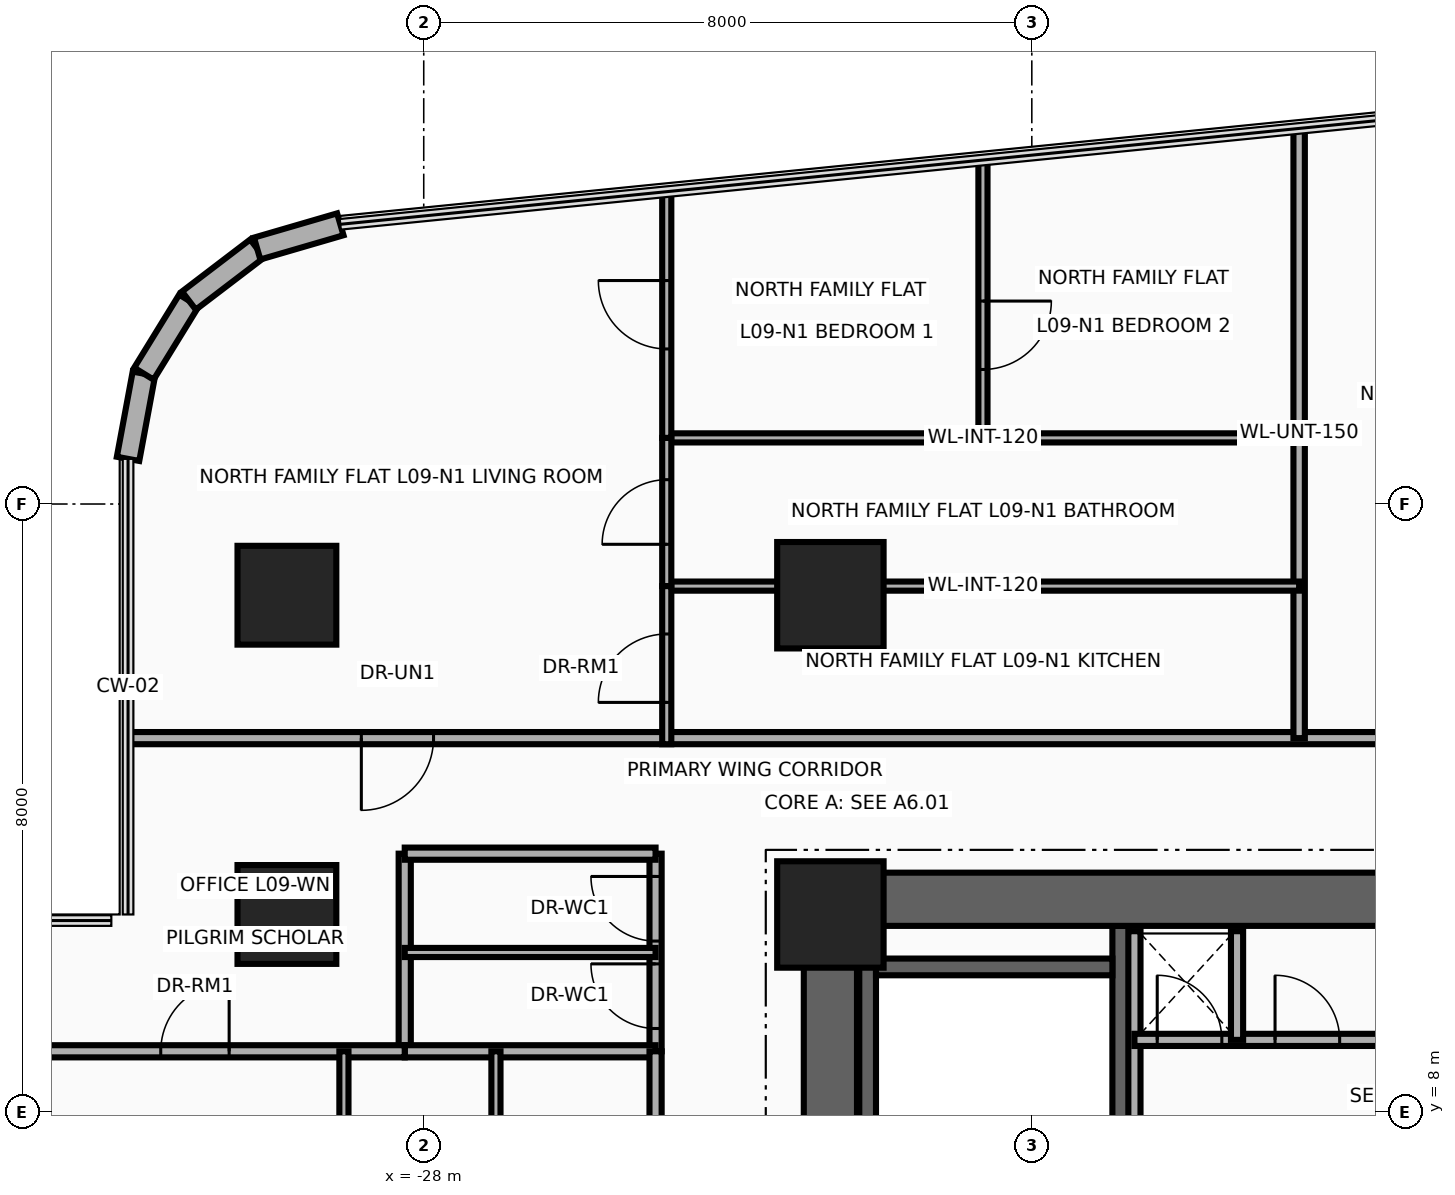
"""IFC4 building model, lengths in metres.
Left out: names, types, materials, properties, quantities, classifications, styles, units other than length and angle.
Written with IfcOpenShell. Run it as: python <this file> out.ifc"""

import sys

from ifc_helpers import new_model, si_unit, direction, frame, frame_2d, origin, origin_2d, place, context, subcontext, project, spatial, rectangle, circle, extrude, source, transform, mapped, element, fill, save


model = new_model("IFC4")
c1 = context("Model", 3, precision=1e-05, world=origin(), true_north=direction((0.0, 1.0)))
c2 = subcontext(c1, "Body", "Model", "MODEL_VIEW")
j1 = project(units=[si_unit("LENGTHUNIT", "METRE"), si_unit("PLANEANGLEUNIT", "RADIAN")], contexts=[c1])
p1 = place(None, origin())
s1 = spatial("IfcSite", under=j1, at=p1, CompositionType="ELEMENT")
p2 = place(p1, origin())
s2 = spatial("IfcBuilding", under=s1, at=p2, CompositionType="ELEMENT")
p3 = place(p2, frame((0.0, 0.0, 40.8)))
s3 = spatial("IfcBuildingStorey", under=s2, at=p3, CompositionType="ELEMENT", Elevation=40.8)
for number, where, z_axis, x_axis in (
    (1, (-22.16, 1.78, 0.0), (0.0, 0.0, 1.0), (0.0, 1.0, 0.0)),
    (2, (-18.83, 1.78, 0.0), (0.0, 0.0, 1.0), (0.0, 1.0, 0.0)),
):
    element("IfcWall", number, at=place(p3, frame(where, z_axis=z_axis, x_axis=x_axis)), inside=s3, PredefinedType="SHEAR", context=c2, shape_type="SweptSolid", body=[
        extrude(rectangle(XDim=8.67, YDim=0.22, at=frame_2d((4.335, 0.0))), origin(), (0.0, 0.0, 1.0), 3.46),
    ])
p4 = place(p3, frame((-22.05, 9.91, 0.0), z_axis=(0.0, 0.0, 1.0), x_axis=(1.0, 0.0, 0.0)))
e3 = element("IfcWall", 3, at=p4, inside=s3, PredefinedType="SHEAR", context=c2, shape_type="SweptSolid", body=[
    extrude(rectangle(XDim=3.11, YDim=0.22, at=frame_2d((1.555, 0.0))), origin(), (0.0, 0.0, 1.0), 3.46),
])
p5 = place(p3, frame((-22.65, -11.15, 0.0), z_axis=(0.0, 0.0, 1.0), x_axis=(0.0, 1.0, 0.0)))
e4 = element("IfcWall", 4, at=p5, inside=s3, PredefinedType="SHEAR", context=c2, shape_type="SweptSolid", body=[
    extrude(rectangle(XDim=22.3, YDim=0.7, at=frame_2d((11.15, 0.0))), origin(), (0.0, 0.0, 1.0), 3.46),
])
p6 = place(p3, frame((-22.65, 10.8, 0.0), z_axis=(0.0, 0.0, 1.0), x_axis=(1.0, 0.0, 0.0)))
e5 = element("IfcWall", 5, at=p6, inside=s3, PredefinedType="SHEAR", context=c2, shape_type="SweptSolid", body=[
    extrude(rectangle(XDim=10.25, YDim=0.7, at=frame_2d((5.125, 0.0))), origin(), (0.0, 0.0, 1.0), 3.46),
])
m1 = source(origin(), c2, "Body", "SweptSolid", [
    extrude(circle(Radius=0.65, at=origin_2d()), origin(), (0.0, 0.0, 1.0), 3.7),
])
p7 = place(p3, frame((-29.8, 10.6, 0.0), z_axis=(0.0, 0.0, 1.0), x_axis=(1.0, 0.0, 0.0)))
e6 = element("IfcColumn", 6, at=p7, inside=s3, PredefinedType="COLUMN", context=c2, shape_type="MappedRepresentation", body=[
    mapped(m1, transform((0.0, 0.0, 0.0), x_axis=(1.0, 0.0, 0.0), y_axis=(0.0, 1.0, 0.0), z_axis=(0.0, 0.0, 1.0), scale=1.0)),
])
m2 = source(origin(), c2, "Body", "SweptSolid", [
    extrude(rectangle(XDim=1.4, YDim=1.4, at=origin_2d()), origin(), (0.0, 0.0, 1.0), 3.7),
])
p8 = place(p3, frame((-22.65, 10.6, 0.0), z_axis=(0.0, 0.0, 1.0), x_axis=(1.0, 0.0, 0.0)))
e7 = element("IfcColumn", 7, at=p8, inside=s3, PredefinedType="COLUMN", context=c2, shape_type="MappedRepresentation", body=[
    mapped(m2, transform((0.0, 0.0, 0.0), x_axis=(1.0, 0.0, 0.0), y_axis=(0.0, 1.0, 0.0), z_axis=(0.0, 0.0, 1.0), scale=1.0)),
])
p9 = place(p3, frame((-29.8, 14.8, 0.0), z_axis=(0.0, 0.0, 1.0), x_axis=(1.0, 0.0, 0.0)))
e8 = element("IfcColumn", 8, at=p9, inside=s3, PredefinedType="COLUMN", context=c2, shape_type="MappedRepresentation", body=[
    mapped(m1, transform((0.0, 0.0, 0.0), x_axis=(1.0, 0.0, 0.0), y_axis=(0.0, 1.0, 0.0), z_axis=(0.0, 0.0, 1.0), scale=1.0)),
])
p10 = place(p3, frame((-22.65, 14.8, 0.0), z_axis=(0.0, 0.0, 1.0), x_axis=(1.0, 0.0, 0.0)))
e9 = element("IfcColumn", 9, at=p10, inside=s3, PredefinedType="COLUMN", context=c2, shape_type="MappedRepresentation", body=[
    mapped(m2, transform((0.0, 0.0, 0.0), x_axis=(1.0, 0.0, 0.0), y_axis=(0.0, 1.0, 0.0), z_axis=(0.0, 0.0, 1.0), scale=1.0)),
])
p11 = place(p3, frame((-31.89, 16.594, 0.0), z_axis=(0.0, 0.0, 1.0), x_axis=(0.182748995683, 0.9831596028, 0.0)))
e10 = element("IfcWall", 10, at=p11, inside=s3, PredefinedType="SOLIDWALL", context=c2, shape_type="SweptSolid", body=[
    extrude(rectangle(XDim=1.14, YDim=0.3, at=frame_2d((0.57, 0.0))), origin(), (0.0, 0.0, 1.0), 3.46),
])
p12 = place(p3, frame((-31.682, 17.714, 0.0), z_axis=(0.0, 0.0, 1.0), x_axis=(0.524157723014, 0.8516212077, 0.0)))
e11 = element("IfcWall", 11, at=p12, inside=s3, PredefinedType="SOLIDWALL", context=c2, shape_type="SweptSolid", body=[
    extrude(rectangle(XDim=1.129, YDim=0.3, at=frame_2d((0.565, 0.0))), origin(), (0.0, 0.0, 1.0), 3.46),
])
p13 = place(p3, frame((-31.09, 18.676, 0.0), z_axis=(0.0, 0.0, 1.0), x_axis=(0.795253002434, 0.606277710393, 0.0)))
e12 = element("IfcWall", 12, at=p13, inside=s3, PredefinedType="SOLIDWALL", context=c2, shape_type="SweptSolid", body=[
    extrude(rectangle(XDim=1.129, YDim=0.3, at=frame_2d((0.564, 0.0))), origin(), (0.0, 0.0, 1.0), 3.46),
])
p14 = place(p3, frame((-30.192, 19.361, 0.0), z_axis=(0.0, 0.0, 1.0), x_axis=(0.960071941549, 0.279753225271, 0.0)))
e13 = element("IfcWall", 13, at=p14, inside=s3, PredefinedType="SOLIDWALL", context=c2, shape_type="SweptSolid", body=[
    extrude(rectangle(XDim=1.14, YDim=0.3, at=frame_2d((0.57, 0.0))), origin(), (0.0, 0.0, 1.0), 3.46),
])
p15 = place(p3, frame((-18.65, 7.45, 0.0), z_axis=(0.0, 0.0, 1.0), x_axis=(0.0, 1.0, 0.0)))
e14 = element("IfcWall", 14, at=p15, inside=s3, PredefinedType="PARTITIONING", context=c2, shape_type="SweptSolid", body=[
    extrude(rectangle(XDim=2.93, YDim=0.16, at=frame_2d((1.465, 0.0))), origin(), (0.0, 0.0, 1.0), 3.46),
])
p16 = place(p3, frame((-18.65, 8.95, 0.0), z_axis=(0.0, 0.0, 1.0), x_axis=(1.0, 0.0, 0.0)))
e15 = element("IfcWall", 15, at=p16, inside=s3, PredefinedType="PARTITIONING", context=c2, shape_type="SweptSolid", body=[
    extrude(rectangle(XDim=5.5, YDim=0.16, at=frame_2d((2.75, 0.0))), origin(), (0.0, 0.0, 1.0), 3.46),
])
p17 = place(p16, frame((0.3, 0.0, 0.0)))
e16 = element("IfcOpeningElement", 16, at=p17, cuts=e15, PredefinedType="OPENING", context=c2, shape_type="SweptSolid", body=[
    extrude(rectangle(XDim=0.85, YDim=2.05, at=frame_2d((0.425, 1.025))), frame((0.0, 0.095, 0.0), z_axis=(0.0, -1.0, 0.0), x_axis=(1.0, 0.0, 0.0)), (0.0, 0.0, 1.0), 0.19),
])
p18 = place(p16, frame((1.85, 0.0, 0.0)))
e17 = element("IfcOpeningElement", 17, at=p18, cuts=e15, PredefinedType="OPENING", context=c2, shape_type="SweptSolid", body=[
    extrude(rectangle(XDim=0.85, YDim=2.05, at=frame_2d((0.425, 1.025))), frame((0.0, 0.095, 0.0), z_axis=(0.0, -1.0, 0.0), x_axis=(1.0, 0.0, 0.0)), (0.0, 0.0, 1.0), 0.19),
])
p19 = place(p16, frame((3.9, 0.0, 0.0)))
e18 = element("IfcOpeningElement", 18, at=p19, cuts=e15, PredefinedType="OPENING", context=c2, shape_type="SweptSolid", body=[
    extrude(rectangle(XDim=0.85, YDim=2.05, at=frame_2d((0.425, 1.025))), frame((0.0, 0.095, 0.0), z_axis=(0.0, -1.0, 0.0), x_axis=(1.0, 0.0, 0.0)), (0.0, 0.0, 1.0), 0.19),
])
p20 = place(p3, frame((-17.3, 8.95, 0.0), z_axis=(0.0, 0.0, 1.0), x_axis=(0.0, 1.0, 0.0)))
e19 = element("IfcWall", 19, at=p20, inside=s3, PredefinedType="PARTITIONING", context=c2, shape_type="SweptSolid", body=[
    extrude(rectangle(XDim=1.43, YDim=0.16, at=frame_2d((0.715, 0.0))), origin(), (0.0, 0.0, 1.0), 3.46),
])
p21 = place(p3, frame((-28.25, 8.8, 0.0), z_axis=(0.0, 0.0, 1.0), x_axis=(0.0, 1.0, 0.0)))
e20 = element("IfcWall", 20, at=p21, inside=s3, PredefinedType="PARTITIONING", context=c2, shape_type="SweptSolid", body=[
    extrude(rectangle(XDim=2.6, YDim=0.16, at=frame_2d((1.3, 0.0))), origin(), (0.0, 0.0, 1.0), 2.583),
])
p22 = place(p3, frame((-24.95, 8.8, 0.0), z_axis=(0.0, 0.0, 1.0), x_axis=(0.0, 1.0, 0.0)))
e21 = element("IfcWall", 21, at=p22, inside=s3, PredefinedType="PARTITIONING", context=c2, shape_type="SweptSolid", body=[
    extrude(rectangle(XDim=2.6, YDim=0.16, at=frame_2d((1.3, 0.0))), origin(), (0.0, 0.0, 1.0), 2.583),
])
p23 = place(p22, frame((0.3, 0.0, 0.0)))
e22 = element("IfcOpeningElement", 22, at=p23, cuts=e21, PredefinedType="OPENING", context=c2, shape_type="SweptSolid", body=[
    extrude(rectangle(XDim=0.85, YDim=2.1, at=frame_2d((0.425, 1.05))), frame((0.0, 0.095, 0.0), z_axis=(0.0, -1.0, 0.0), x_axis=(1.0, 0.0, 0.0)), (0.0, 0.0, 1.0), 0.19),
])
p24 = place(p22, frame((1.45, 0.0, 0.0)))
e23 = element("IfcOpeningElement", 23, at=p24, cuts=e21, PredefinedType="OPENING", context=c2, shape_type="SweptSolid", body=[
    extrude(rectangle(XDim=0.85, YDim=2.1, at=frame_2d((0.425, 1.05))), frame((0.0, 0.095, 0.0), z_axis=(0.0, -1.0, 0.0), x_axis=(1.0, 0.0, 0.0)), (0.0, 0.0, 1.0), 0.19),
])
for number, where, z_axis, x_axis in (
    (24, (-28.25, 8.8, 0.0), (0.0, 0.0, 1.0), (1.0, 0.0, 0.0)),
    (25, (-28.25, 11.4, 0.0), (0.0, 0.0, 1.0), (1.0, 0.0, 0.0)),
):
    element("IfcWall", number, at=place(p3, frame(where, z_axis=z_axis, x_axis=x_axis)), inside=s3, PredefinedType="PARTITIONING", context=c2, shape_type="SweptSolid", body=[
        extrude(rectangle(XDim=3.3, YDim=0.16, at=frame_2d((1.65, 0.0))), origin(), (0.0, 0.0, 1.0), 3.46),
    ])
p25 = place(p3, frame((-28.25, 10.1, 0.0), z_axis=(0.0, 0.0, 1.0), x_axis=(1.0, 0.0, 0.0)))
e26 = element("IfcWall", 26, at=p25, inside=s3, PredefinedType="PARTITIONING", context=c2, shape_type="SweptSolid", body=[
    extrude(rectangle(XDim=3.3, YDim=0.12, at=frame_2d((1.65, 0.0))), origin(), (0.0, 0.0, 1.0), 3.46),
])
p26 = place(p3, frame((-24.95, -11.42, 0.0), z_axis=(0.0, 0.0, 1.0), x_axis=(0.0, 1.0, 0.0)))
e27 = element("IfcWall", 27, at=p26, inside=s3, PredefinedType="PARTITIONING", context=c2, shape_type="SweptSolid", body=[
    extrude(rectangle(XDim=20.22, YDim=0.16, at=frame_2d((10.11, 0.0))), origin(), (0.0, 0.0, 1.0), 2.583),
])
p27 = place(p26, frame((1.85, 0.0, 0.0)))
e28 = element("IfcOpeningElement", 28, at=p27, cuts=e27, PredefinedType="OPENING", context=c2, shape_type="SweptSolid", body=[
    extrude(rectangle(XDim=0.95, YDim=2.15, at=frame_2d((0.475, 1.075))), frame((0.0, 0.095, 0.0), z_axis=(0.0, -1.0, 0.0), x_axis=(1.0, 0.0, 0.0)), (0.0, 0.0, 1.0), 0.19),
])
p28 = place(p26, frame((11.96, 0.0, 0.0)))
e29 = element("IfcOpeningElement", 29, at=p28, cuts=e27, PredefinedType="OPENING", context=c2, shape_type="SweptSolid", body=[
    extrude(rectangle(XDim=0.95, YDim=2.15, at=frame_2d((0.475, 1.075))), frame((0.0, 0.095, 0.0), z_axis=(0.0, -1.0, 0.0), x_axis=(1.0, 0.0, 0.0)), (0.0, 0.0, 1.0), 0.19),
])
p29 = place(p3, frame((-33.54, 8.8, 0.0), z_axis=(0.0, 0.0, 1.0), x_axis=(1.0, 0.0, 0.0)))
e30 = element("IfcWall", 30, at=p29, inside=s3, PredefinedType="PARTITIONING", context=c2, shape_type="SweptSolid", body=[
    extrude(rectangle(XDim=5.29, YDim=0.16, at=frame_2d((2.645, 0.0))), origin(), (0.0, 0.0, 1.0), 2.896),
])
p30 = place(p29, frame((2.08, 0.0, 0.0)))
e31 = element("IfcOpeningElement", 31, at=p30, cuts=e30, PredefinedType="OPENING", context=c2, shape_type="SweptSolid", body=[
    extrude(rectangle(XDim=0.9, YDim=2.1, at=frame_2d((0.45, 1.05))), frame((0.0, 0.095, 0.0), z_axis=(0.0, -1.0, 0.0), x_axis=(1.0, 0.0, 0.0)), (0.0, 0.0, 1.0), 0.19),
])
for number, where, z_axis, x_axis in (
    (32, (-27.05, 3.341, 0.0), (0.0, 0.0, 1.0), (0.0, 1.0, 0.0)),
    (33, (-29.05, 3.341, 0.0), (0.0, 0.0, 1.0), (0.0, 1.0, 0.0)),
):
    element("IfcWall", number, at=place(p3, frame(where, z_axis=z_axis, x_axis=x_axis)), inside=s3, PredefinedType="PARTITIONING", context=c2, shape_type="SweptSolid", body=[
        extrude(rectangle(XDim=5.459, YDim=0.12, at=frame_2d((2.73, 0.0))), origin(), (0.0, 0.0, 1.0), 2.979),
    ])
p31 = place(p3, frame((-31.89, 12.92, 0.0), z_axis=(0.0, 0.0, 1.0), x_axis=(1.0, 0.0, 0.0)))
e34 = element("IfcWall", 34, at=p31, inside=s3, PredefinedType="PARTITIONING", context=c2, shape_type="SweptSolid", body=[
    extrude(rectangle(XDim=45.44, YDim=0.16, at=frame_2d((22.72, 0.0))), origin(), (0.0, 0.0, 1.0), 2.583),
])
p32 = place(p31, frame((3.069, 0.0, 0.0)))
e35 = element("IfcOpeningElement", 35, at=p32, cuts=e34, PredefinedType="OPENING", context=c2, shape_type="SweptSolid", body=[
    extrude(rectangle(XDim=0.95, YDim=2.15, at=frame_2d((0.475, 1.075))), frame((0.0, 0.095, 0.0), z_axis=(0.0, -1.0, 0.0), x_axis=(1.0, 0.0, 0.0)), (0.0, 0.0, 1.0), 0.19),
])
p33 = place(p31, frame((17.647, 0.0, 0.0)))
e36 = element("IfcOpeningElement", 36, at=p33, cuts=e34, PredefinedType="OPENING", context=c2, shape_type="SweptSolid", body=[
    extrude(rectangle(XDim=0.95, YDim=2.15, at=frame_2d((0.475, 1.075))), frame((0.0, 0.095, 0.0), z_axis=(0.0, -1.0, 0.0), x_axis=(1.0, 0.0, 0.0)), (0.0, 0.0, 1.0), 0.19),
])
p34 = place(p31, frame((34.227, 0.0, 0.0)))
e37 = element("IfcOpeningElement", 37, at=p34, cuts=e34, PredefinedType="OPENING", context=c2, shape_type="SweptSolid", body=[
    extrude(rectangle(XDim=0.95, YDim=2.15, at=frame_2d((0.475, 1.075))), frame((0.0, 0.095, 0.0), z_axis=(0.0, -1.0, 0.0), x_axis=(1.0, 0.0, 0.0)), (0.0, 0.0, 1.0), 0.19),
])
p35 = place(p3, frame((-16.483, 12.92, 0.0), z_axis=(0.0, 0.0, 1.0), x_axis=(0.0, 1.0, 0.0)))
e38 = element("IfcWall", 38, at=p35, inside=s3, PredefinedType="PARTITIONING", context=c2, shape_type="SweptSolid", body=[
    extrude(rectangle(XDim=8.021, YDim=0.15, at=frame_2d((4.011, 0.0))), origin(), (0.0, 0.0, 1.0), 2.583),
])
p36 = place(p3, frame((-24.803, 14.92, 0.0), z_axis=(0.0, 0.0, 1.0), x_axis=(1.0, 0.0, 0.0)))
e39 = element("IfcWall", 39, at=p36, inside=s3, PredefinedType="PARTITIONING", context=c2, shape_type="SweptSolid", body=[
    extrude(rectangle(XDim=8.32, YDim=0.12, at=frame_2d((4.16, 0.0))), origin(), (0.0, 0.0, 1.0), 2.583),
])
p37 = place(p3, frame((-24.803, 16.87, 0.0), z_axis=(0.0, 0.0, 1.0), x_axis=(1.0, 0.0, 0.0)))
e40 = element("IfcWall", 40, at=p37, inside=s3, PredefinedType="PARTITIONING", context=c2, shape_type="SweptSolid", body=[
    extrude(rectangle(XDim=8.32, YDim=0.12, at=frame_2d((4.16, 0.0))), origin(), (0.0, 0.0, 1.0), 3.46),
])
p38 = place(p3, frame((-24.803, 14.92, 0.0), z_axis=(0.0, 0.0, 1.0), x_axis=(0.0, 1.0, 0.0)))
e41 = element("IfcWall", 41, at=p38, inside=s3, PredefinedType="PARTITIONING", context=c2, shape_type="SweptSolid", body=[
    extrude(rectangle(XDim=1.95, YDim=0.12, at=frame_2d((0.975, 0.0))), origin(), (0.0, 0.0, 1.0), 2.583),
])
p39 = place(p38, frame((0.55, 0.0, 0.0)))
e42 = element("IfcOpeningElement", 42, at=p39, cuts=e41, PredefinedType="OPENING", context=c2, shape_type="SweptSolid", body=[
    extrude(rectangle(XDim=0.85, YDim=2.1, at=frame_2d((0.425, 1.05))), frame((0.0, 0.075, 0.0), z_axis=(0.0, -1.0, 0.0), x_axis=(1.0, 0.0, 0.0)), (0.0, 0.0, 1.0), 0.15),
])
p40 = place(p3, frame((-24.803, 12.84, 0.0), z_axis=(0.0, 0.0, 1.0), x_axis=(0.0, 1.0, 0.0)))
e43 = element("IfcWall", 43, at=p40, inside=s3, PredefinedType="PARTITIONING", context=c2, shape_type="SweptSolid", body=[
    extrude(rectangle(XDim=2.08, YDim=0.12, at=frame_2d((1.04, 0.0))), origin(), (0.0, 0.0, 1.0), 2.583),
])
p41 = place(p40, frame((0.55, 0.0, 0.0)))
e44 = element("IfcOpeningElement", 44, at=p41, cuts=e43, PredefinedType="OPENING", context=c2, shape_type="SweptSolid", body=[
    extrude(rectangle(XDim=0.9, YDim=2.1, at=frame_2d((0.45, 1.05))), frame((0.0, 0.075, 0.0), z_axis=(0.0, -1.0, 0.0), x_axis=(1.0, 0.0, 0.0)), (0.0, 0.0, 1.0), 0.15),
])
p42 = place(p3, frame((-24.803, 16.87, 0.0), z_axis=(0.0, 0.0, 1.0), x_axis=(0.0, 1.0, 0.0)))
e45 = element("IfcWall", 45, at=p42, inside=s3, PredefinedType="PARTITIONING", context=c2, shape_type="SweptSolid", body=[
    extrude(rectangle(XDim=3.239, YDim=0.12, at=frame_2d((1.62, 0.0))), origin(), (0.0, 0.0, 1.0), 3.46),
])
p43 = place(p42, frame((1.17, 0.0, 0.0)))
e46 = element("IfcOpeningElement", 46, at=p43, cuts=e45, PredefinedType="OPENING", context=c2, shape_type="SweptSolid", body=[
    extrude(rectangle(XDim=0.9, YDim=2.1, at=frame_2d((0.45, 1.05))), frame((0.0, 0.075, 0.0), z_axis=(0.0, -1.0, 0.0), x_axis=(1.0, 0.0, 0.0)), (0.0, 0.0, 1.0), 0.15),
])
p44 = place(p3, frame((-20.643, 16.87, 0.0), z_axis=(0.0, 0.0, 1.0), x_axis=(0.0, 1.0, 0.0)))
e47 = element("IfcWall", 47, at=p44, inside=s3, PredefinedType="PARTITIONING", context=c2, shape_type="SweptSolid", body=[
    extrude(rectangle(XDim=3.655, YDim=0.12, at=frame_2d((1.828, 0.0))), origin(), (0.0, 0.0, 1.0), 3.46),
])
p45 = place(p44, frame((0.9, 0.0, 0.0)))
e48 = element("IfcOpeningElement", 48, at=p45, cuts=e47, PredefinedType="OPENING", context=c2, shape_type="SweptSolid", body=[
    extrude(rectangle(XDim=0.9, YDim=2.1, at=frame_2d((0.45, 1.05))), frame((0.0, 0.075, 0.0), z_axis=(0.0, -1.0, 0.0), x_axis=(1.0, 0.0, 0.0)), (0.0, 0.0, 1.0), 0.15),
])
p46 = place(p17, origin())
e49 = element("IfcDoor", 49, at=p46, inside=s3, OperationType="SINGLE_SWING_LEFT", PredefinedType="DOOR", context=c2, shape_type="SweptSolid", body=[
    extrude(rectangle(XDim=0.85, YDim=2.05, at=frame_2d((0.425, 1.025))), frame((0.0, 0.025, 0.0), z_axis=(0.0, -1.0, 0.0), x_axis=(1.0, 0.0, 0.0)), (0.0, 0.0, 1.0), 0.05),
])
fill(e16, e49)
p47 = place(p18, origin())
e50 = element("IfcDoor", 50, at=p47, inside=s3, OperationType="SINGLE_SWING_RIGHT", PredefinedType="DOOR", context=c2, shape_type="SweptSolid", body=[
    extrude(rectangle(XDim=0.85, YDim=2.05, at=frame_2d((0.425, 1.025))), frame((0.0, 0.025, 0.0), z_axis=(0.0, -1.0, 0.0), x_axis=(1.0, 0.0, 0.0)), (0.0, 0.0, 1.0), 0.05),
])
fill(e17, e50)
p48 = place(p23, origin())
e51 = element("IfcDoor", 51, at=p48, inside=s3, OperationType="SINGLE_SWING_RIGHT", PredefinedType="DOOR", context=c2, shape_type="SweptSolid", body=[
    extrude(rectangle(XDim=0.85, YDim=2.1, at=frame_2d((0.425, 1.05))), frame((0.0, 0.025, 0.0), z_axis=(0.0, -1.0, 0.0), x_axis=(1.0, 0.0, 0.0)), (0.0, 0.0, 1.0), 0.05),
])
fill(e22, e51)
p49 = place(p24, origin())
e52 = element("IfcDoor", 52, at=p49, inside=s3, OperationType="SINGLE_SWING_LEFT", PredefinedType="DOOR", context=c2, shape_type="SweptSolid", body=[
    extrude(rectangle(XDim=0.85, YDim=2.1, at=frame_2d((0.425, 1.05))), frame((0.0, 0.025, 0.0), z_axis=(0.0, -1.0, 0.0), x_axis=(1.0, 0.0, 0.0)), (0.0, 0.0, 1.0), 0.05),
])
fill(e23, e52)
p50 = place(p30, origin())
e53 = element("IfcDoor", 53, at=p50, inside=s3, OperationType="SINGLE_SWING_RIGHT", PredefinedType="DOOR", context=c2, shape_type="SweptSolid", body=[
    extrude(rectangle(XDim=0.9, YDim=2.1, at=frame_2d((0.45, 1.05))), frame((0.0, 0.025, 0.0), z_axis=(0.0, -1.0, 0.0), x_axis=(1.0, 0.0, 0.0)), (0.0, 0.0, 1.0), 0.05),
])
fill(e31, e53)
p51 = place(p32, frame((0.95, 0.0, 0.0), z_axis=(0.0, 0.0, 1.0), x_axis=(-1.0, 0.0, 0.0)))
e54 = element("IfcDoor", 54, at=p51, inside=s3, OperationType="SINGLE_SWING_LEFT", PredefinedType="DOOR", context=c2, shape_type="SweptSolid", body=[
    extrude(rectangle(XDim=0.95, YDim=2.15, at=frame_2d((0.475, 1.075))), frame((0.0, 0.025, 0.0), z_axis=(0.0, -1.0, 0.0), x_axis=(1.0, 0.0, 0.0)), (0.0, 0.0, 1.0), 0.05),
])
fill(e35, e54)
p52 = place(p39, origin())
e55 = element("IfcDoor", 55, at=p52, inside=s3, OperationType="SINGLE_SWING_RIGHT", PredefinedType="DOOR", context=c2, shape_type="SweptSolid", body=[
    extrude(rectangle(XDim=0.85, YDim=2.1, at=frame_2d((0.425, 1.05))), frame((0.0, 0.025, 0.0), z_axis=(0.0, -1.0, 0.0), x_axis=(1.0, 0.0, 0.0)), (0.0, 0.0, 1.0), 0.05),
])
fill(e42, e55)
p53 = place(p41, origin())
e56 = element("IfcDoor", 56, at=p53, inside=s3, OperationType="SINGLE_SWING_LEFT", PredefinedType="DOOR", context=c2, shape_type="SweptSolid", body=[
    extrude(rectangle(XDim=0.9, YDim=2.1, at=frame_2d((0.45, 1.05))), frame((0.0, 0.025, 0.0), z_axis=(0.0, -1.0, 0.0), x_axis=(1.0, 0.0, 0.0)), (0.0, 0.0, 1.0), 0.05),
])
fill(e44, e56)
p54 = place(p43, origin())
e57 = element("IfcDoor", 57, at=p54, inside=s3, OperationType="SINGLE_SWING_RIGHT", PredefinedType="DOOR", context=c2, shape_type="SweptSolid", body=[
    extrude(rectangle(XDim=0.9, YDim=2.1, at=frame_2d((0.45, 1.05))), frame((0.0, 0.025, 0.0), z_axis=(0.0, -1.0, 0.0), x_axis=(1.0, 0.0, 0.0)), (0.0, 0.0, 1.0), 0.05),
])
fill(e46, e57)
p55 = place(p45, frame((0.9, 0.0, 0.0), z_axis=(0.0, 0.0, 1.0), x_axis=(-1.0, 0.0, 0.0)))
e58 = element("IfcDoor", 58, at=p55, inside=s3, OperationType="SINGLE_SWING_LEFT", PredefinedType="DOOR", context=c2, shape_type="SweptSolid", body=[
    extrude(rectangle(XDim=0.9, YDim=2.1, at=frame_2d((0.45, 1.05))), frame((0.0, 0.025, 0.0), z_axis=(0.0, -1.0, 0.0), x_axis=(1.0, 0.0, 0.0)), (0.0, 0.0, 1.0), 0.05),
])
fill(e48, e58)
save(model, sys.argv[1])
